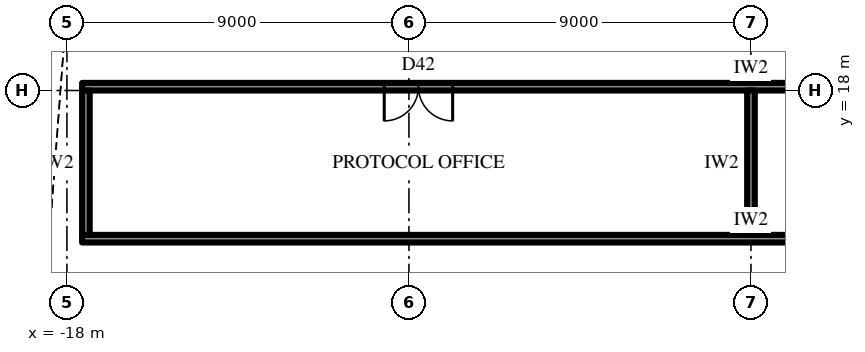
"""IFC4 building model, lengths in metres.
Left out: names, types, materials, properties, quantities, classifications, styles, units other than length and angle.
Written with IfcOpenShell. Run it as: python <this file> out.ifc"""

import sys

from ifc_helpers import new_model, si_unit, direction, frame, frame_2d, origin, place, context, subcontext, project, spatial, rectangle, extrude, element, fill, save


model = new_model("IFC4")
c1 = context("Model", 3, precision=1e-05, world=origin(), true_north=direction((0.0, 1.0)))
c2 = subcontext(c1, "Body", "Model", "MODEL_VIEW")
j1 = project(units=[si_unit("LENGTHUNIT", "METRE"), si_unit("PLANEANGLEUNIT", "RADIAN")], contexts=[c1])
p1 = place(None, origin())
s1 = spatial("IfcSite", under=j1, at=p1, CompositionType="ELEMENT")
p2 = place(p1, origin())
s2 = spatial("IfcBuilding", under=s1, at=p2, CompositionType="ELEMENT")
p3 = place(p2, frame((0.0, 0.0, 190.9)))
s3 = spatial("IfcBuildingStorey", under=s2, at=p3, CompositionType="ELEMENT", Elevation=190.9)
p4 = place(p3, frame((-17.6, 14.1, 0.0), z_axis=(0.0, 0.0, 1.0), x_axis=(1.0, 0.0, 0.0)))
e1 = element("IfcWall", 1, at=p4, inside=s3, PredefinedType="PARTITIONING", context=c2, shape_type="SweptSolid", body=[
    extrude(rectangle(XDim=35.2, YDim=0.2, at=frame_2d((17.6, 0.0))), origin(), (0.0, 0.0, 1.0), 4.0),
])
p5 = place(p3, frame((-17.6, 18.1, 0.0), z_axis=(0.0, 0.0, 1.0), x_axis=(1.0, 0.0, 0.0)))
e2 = element("IfcWall", 2, at=p5, inside=s3, PredefinedType="PARTITIONING", context=c2, shape_type="SweptSolid", body=[
    extrude(rectangle(XDim=35.2, YDim=0.2, at=frame_2d((17.6, 0.0))), origin(), (0.0, 0.0, 1.0), 4.0),
])
p6 = place(p5, frame((7.95, 0.0, 0.0)))
e3 = element("IfcOpeningElement", 3, at=p6, cuts=e2, PredefinedType="OPENING", context=c2, shape_type="SweptSolid", body=[
    extrude(rectangle(XDim=1.8, YDim=2.4, at=frame_2d((0.9, 1.2))), frame((0.0, 0.11, 0.0), z_axis=(0.0, -1.0, 0.0), x_axis=(1.0, 0.0, 0.0)), (0.0, 0.0, 1.0), 0.22),
])
p7 = place(p5, frame((25.45, 0.0, 0.0)))
e4 = element("IfcOpeningElement", 4, at=p7, cuts=e2, PredefinedType="OPENING", context=c2, shape_type="SweptSolid", body=[
    extrude(rectangle(XDim=1.8, YDim=2.4, at=frame_2d((0.9, 1.2))), frame((0.0, 0.11, 0.0), z_axis=(0.0, -1.0, 0.0), x_axis=(1.0, 0.0, 0.0)), (0.0, 0.0, 1.0), 0.22),
])
p8 = place(p3, frame((-17.5, 14.2, 0.0), z_axis=(0.0, 0.0, 1.0), x_axis=(0.0, 1.0, 0.0)))
e5 = element("IfcWall", 5, at=p8, inside=s3, PredefinedType="PARTITIONING", context=c2, shape_type="SweptSolid", body=[
    extrude(rectangle(XDim=3.8, YDim=0.2, at=frame_2d((1.9, 0.0))), origin(), (0.0, 0.0, 1.0), 4.0),
])
p9 = place(p3, frame((0.0, 14.2, 0.0), z_axis=(0.0, 0.0, 1.0), x_axis=(0.0, 1.0, 0.0)))
e6 = element("IfcWall", 6, at=p9, inside=s3, PredefinedType="PARTITIONING", context=c2, shape_type="SweptSolid", body=[
    extrude(rectangle(XDim=3.8, YDim=0.2, at=frame_2d((1.9, 0.0))), origin(), (0.0, 0.0, 1.0), 2.992),
])
p10 = place(p6, frame((1.8, 0.0, 0.0), z_axis=(0.0, 0.0, 1.0), x_axis=(-1.0, 0.0, 0.0)))
e7 = element("IfcDoor", 7, at=p10, inside=s3, OperationType="DOUBLE_DOOR_SINGLE_SWING", PredefinedType="DOOR", context=c2, shape_type="SweptSolid", body=[
    extrude(rectangle(XDim=1.8, YDim=2.4, at=frame_2d((0.9, 1.2))), frame((0.0, 0.025, 0.0), z_axis=(0.0, -1.0, 0.0), x_axis=(1.0, 0.0, 0.0)), (0.0, 0.0, 1.0), 0.05),
])
fill(e3, e7)
save(model, sys.argv[1])
